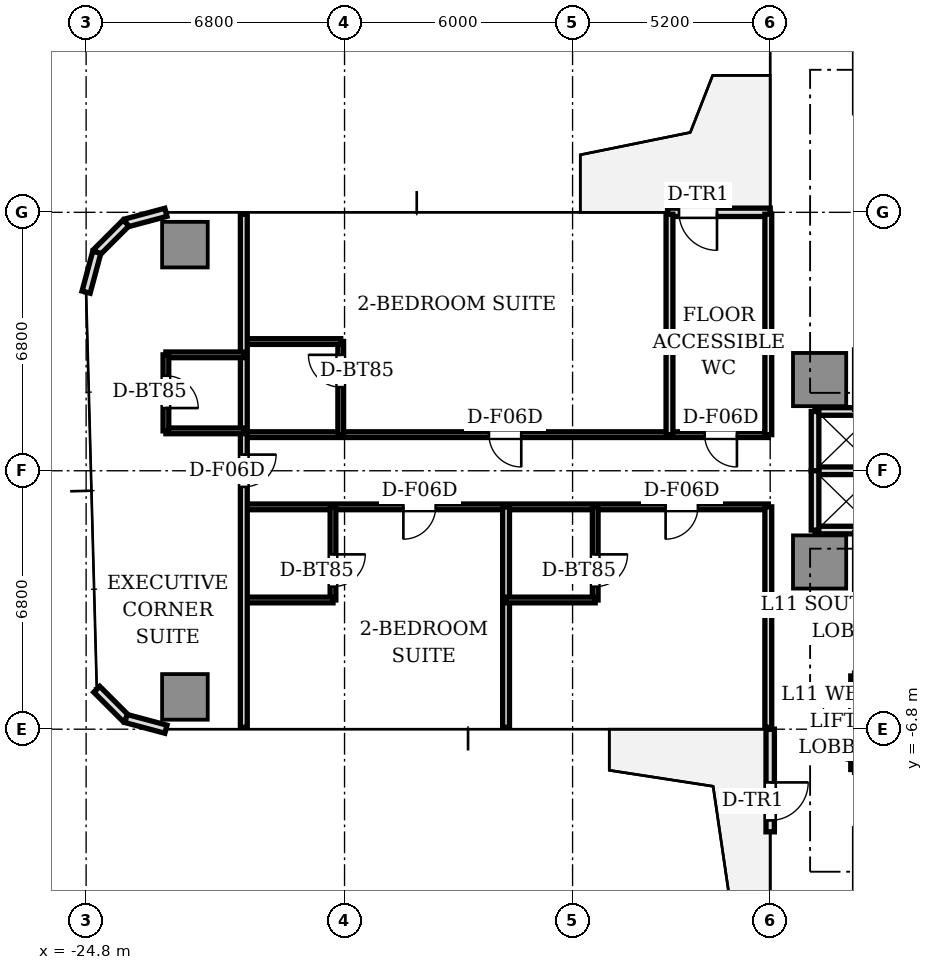
"""IFC4 building model, lengths in metres.
Left out: names, types, materials, properties, quantities, classifications, styles, units other than length and angle.
Written with IfcOpenShell. Run it as: python <this file> out.ifc"""

import sys

from ifc_helpers import new_model, si_unit, direction, frame, frame_2d, origin, origin_2d, place, context, subcontext, project, spatial, rectangle, extrude, source, transform, mapped, element, fill, save


model = new_model("IFC4")
c1 = context("Model", 3, precision=1e-05, world=origin(), true_north=direction((0.0, 1.0)))
c2 = subcontext(c1, "Body", "Model", "MODEL_VIEW")
j1 = project(units=[si_unit("LENGTHUNIT", "METRE"), si_unit("PLANEANGLEUNIT", "RADIAN")], contexts=[c1])
p1 = place(None, origin())
s1 = spatial("IfcSite", under=j1, at=p1, CompositionType="ELEMENT")
p2 = place(p1, origin())
s2 = spatial("IfcBuilding", under=s1, at=p2, CompositionType="ELEMENT")
p3 = place(p2, frame((0.0, 0.0, 43.2)))
s3 = spatial("IfcBuildingStorey", under=s2, at=p3, CompositionType="ELEMENT", Elevation=43.2)
m1 = source(origin(), c2, "Body", "SweptSolid", [
    extrude(rectangle(XDim=1.4, YDim=1.4, at=origin_2d()), origin(), (0.0, 0.0, 1.0), 3.05),
])
for number, where, z_axis, x_axis in (
    (1, (-5.5, 2.4, 0.0), (0.0, 0.0, 1.0), (1.0, 0.0, 0.0)),
    (2, (-5.5, -2.4, 0.0), (0.0, 0.0, 1.0), (1.0, 0.0, 0.0)),
):
    element("IfcColumn", number, at=place(p3, frame(where, z_axis=z_axis, x_axis=x_axis)), inside=s3, PredefinedType="COLUMN", context=c2, shape_type="MappedRepresentation", body=[
        mapped(m1, transform((0.0, 0.0, 0.0), scale=1.0)),
    ])
m2 = source(origin(), c2, "Body", "SweptSolid", [
    extrude(rectangle(XDim=1.2, YDim=1.2, at=origin_2d()), origin(), (0.0, 0.0, 1.0), 3.05),
])
for number, where, z_axis, x_axis in (
    (3, (-22.2, 5.95, 0.0), (0.0, 0.0, 1.0), (1.0, 0.0, 0.0)),
    (4, (-22.2, -5.95, 0.0), (0.0, 0.0, 1.0), (1.0, 0.0, 0.0)),
):
    element("IfcColumn", number, at=place(p3, frame(where, z_axis=z_axis, x_axis=x_axis)), inside=s3, PredefinedType="COLUMN", context=c2, shape_type="MappedRepresentation", body=[
        mapped(m2, transform((0.0, 0.0, 0.0), scale=1.0)),
    ])
p4 = place(p3, frame((-6.8, 6.8, 0.0), z_axis=(0.0, 0.0, 1.0), x_axis=(-1.0, 0.0, 0.0)))
e5 = element("IfcWall", 5, at=p4, inside=s3, PredefinedType="STANDARD", context=c2, shape_type="SweptSolid", body=[
    extrude(rectangle(XDim=2.7, YDim=0.22, at=frame_2d((1.35, 0.0))), origin(), (0.0, 0.0, 1.0), 3.05),
])
p5 = place(p4, frame((1.4, 0.0, 0.0)))
e6 = element("IfcOpeningElement", 6, at=p5, cuts=e5, PredefinedType="OPENING", context=c2, shape_type="SweptSolid", body=[
    extrude(rectangle(XDim=1.0, YDim=2.2, at=frame_2d((0.5, 1.1))), frame((0.0, 0.12, 0.0), z_axis=(0.0, -1.0, 0.0), x_axis=(1.0, 0.0, 0.0)), (0.0, 0.0, 1.0), 0.24),
])
for number, where, z_axis, x_axis in (
    (7, (-22.7, 6.8, 0.0), (0.0, 0.0, 1.0), (-0.966, -0.259, 0.0)),
    (8, (-23.75, 6.519, 0.0), (0.0, 0.0, 1.0), (-0.707, -0.707, 0.0)),
    (9, (-24.519, 5.75, 0.0), (0.0, 0.0, 1.0), (-0.259, -0.966, 0.0)),
    (10, (-24.519, -5.75, 0.0), (0.0, 0.0, 1.0), (0.707, -0.707, 0.0)),
    (11, (-23.75, -6.519, 0.0), (0.0, 0.0, 1.0), (0.966, -0.259, 0.0)),
):
    element("IfcWall", number, at=place(p3, frame(where, z_axis=z_axis, x_axis=x_axis)), inside=s3, PredefinedType="STANDARD", context=c2, shape_type="SweptSolid", body=[
        extrude(rectangle(XDim=1.087, YDim=0.22, at=frame_2d((0.543, 0.0))), origin(), (0.0, 0.0, 1.0), 3.05),
    ])
p6 = place(p3, frame((-6.8, -6.8, 0.0), z_axis=(0.0, 0.0, 1.0), x_axis=(0.0, -1.0, 0.0)))
e12 = element("IfcWall", 12, at=p6, inside=s3, PredefinedType="STANDARD", context=c2, shape_type="SweptSolid", body=[
    extrude(rectangle(XDim=2.7, YDim=0.22, at=frame_2d((1.35, 0.0))), origin(), (0.0, 0.0, 1.0), 3.05),
])
p7 = place(p6, frame((1.4, 0.0, 0.0)))
e13 = element("IfcOpeningElement", 13, at=p7, cuts=e12, PredefinedType="OPENING", context=c2, shape_type="SweptSolid", body=[
    extrude(rectangle(XDim=1.0, YDim=2.2, at=frame_2d((0.5, 1.1))), frame((0.0, 0.12, 0.0), z_axis=(0.0, -1.0, 0.0), x_axis=(1.0, 0.0, 0.0)), (0.0, 0.0, 1.0), 0.24),
])
for number, where, z_axis, x_axis in (
    (14, (-5.62, 1.56, 0.0), (0.0, 0.0, 1.0), (1.0, 0.0, 0.0)),
    (15, (-5.62, -1.56, 0.0), (0.0, 0.0, 1.0), (1.0, 0.0, 0.0)),
    (16, (-5.62, 0.0, 0.0), (0.0, 0.0, 1.0), (1.0, 0.0, 0.0)),
):
    element("IfcWall", number, at=place(p3, frame(where, z_axis=z_axis, x_axis=x_axis)), inside=s3, PredefinedType="SOLIDWALL", context=c2, shape_type="SweptSolid", body=[
        extrude(rectangle(XDim=1.64, YDim=0.2, at=frame_2d((0.82, 0.0))), origin(), (0.0, 0.0, 1.0), 2.6),
    ])
for number, where, z_axis, x_axis in (
    (17, (-5.62, 0.0, 0.0), (0.0, 0.0, 1.0), (0.0, 1.0, 0.0)),
    (18, (-5.62, -1.56, 0.0), (0.0, 0.0, 1.0), (0.0, 1.0, 0.0)),
):
    element("IfcWall", number, at=place(p3, frame(where, z_axis=z_axis, x_axis=x_axis)), inside=s3, PredefinedType="SOLIDWALL", context=c2, shape_type="SweptSolid", body=[
        extrude(rectangle(XDim=1.56, YDim=0.2, at=frame_2d((0.78, 0.0))), origin(), (0.0, 0.0, 1.0), 2.6),
    ])
p8 = place(p3, frame((-4.58, -7.86, 0.0), z_axis=(0.0, 0.0, 1.0), x_axis=(0.0, 1.0, 0.0)))
e19 = element("IfcWall", 19, at=p8, inside=s3, PredefinedType="SOLIDWALL", context=c2, shape_type="SweptSolid", body=[
    extrude(rectangle(XDim=2.46, YDim=0.2, at=frame_2d((1.23, 0.0))), origin(), (0.0, 0.0, 1.0), 2.6),
])
p9 = place(p8, frame((0.2, 0.0, 0.0)))
e20 = element("IfcOpeningElement", 20, at=p9, cuts=e19, PredefinedType="OPENING", context=c2, shape_type="SweptSolid", body=[
    extrude(rectangle(XDim=0.85, YDim=2.1, at=frame_2d((0.425, 1.05))), frame((0.0, 0.11, 0.0), z_axis=(0.0, -1.0, 0.0), x_axis=(1.0, 0.0, 0.0)), (0.0, 0.0, 1.0), 0.22),
])
p10 = place(p8, frame((1.38, 0.0, 0.0)))
e21 = element("IfcOpeningElement", 21, at=p10, cuts=e19, PredefinedType="OPENING", context=c2, shape_type="SweptSolid", body=[
    extrude(rectangle(XDim=0.85, YDim=2.1, at=frame_2d((0.425, 1.05))), frame((0.0, 0.11, 0.0), z_axis=(0.0, -1.0, 0.0), x_axis=(1.0, 0.0, 0.0)), (0.0, 0.0, 1.0), 0.22),
])
p11 = place(p3, frame((-6.85, -0.95, 0.0), z_axis=(0.0, 0.0, 1.0), x_axis=(-1.0, 0.0, 0.0)))
e22 = element("IfcWall", 22, at=p11, inside=s3, PredefinedType="PARTITIONING", context=c2, shape_type="SweptSolid", body=[
    extrude(rectangle(XDim=13.8, YDim=0.15, at=frame_2d((6.9, 0.0))), origin(), (0.0, 0.0, 1.0), 2.6),
])
p12 = place(p11, frame((1.852, 0.0, 0.0)))
e23 = element("IfcOpeningElement", 23, at=p12, cuts=e22, PredefinedType="OPENING", context=c2, shape_type="SweptSolid", body=[
    extrude(rectangle(XDim=0.85, YDim=2.1, at=frame_2d((0.425, 1.05))), frame((0.0, 0.085, 0.0), z_axis=(0.0, -1.0, 0.0), x_axis=(1.0, 0.0, 0.0)), (0.0, 0.0, 1.0), 0.17),
])
p13 = place(p11, frame((8.752, 0.0, 0.0)))
e24 = element("IfcOpeningElement", 24, at=p13, cuts=e22, PredefinedType="OPENING", context=c2, shape_type="SweptSolid", body=[
    extrude(rectangle(XDim=0.85, YDim=2.1, at=frame_2d((0.425, 1.05))), frame((0.0, 0.085, 0.0), z_axis=(0.0, -1.0, 0.0), x_axis=(1.0, 0.0, 0.0)), (0.0, 0.0, 1.0), 0.17),
])
p14 = place(p3, frame((-6.85, 0.95, 0.0), z_axis=(0.0, 0.0, 1.0), x_axis=(-1.0, 0.0, 0.0)))
e25 = element("IfcWall", 25, at=p14, inside=s3, PredefinedType="PARTITIONING", context=c2, shape_type="SweptSolid", body=[
    extrude(rectangle(XDim=13.8, YDim=0.15, at=frame_2d((6.9, 0.0))), origin(), (0.0, 0.0, 1.0), 2.6),
])
p15 = place(p14, frame((0.825, 0.0, 0.0)))
e26 = element("IfcOpeningElement", 26, at=p15, cuts=e25, PredefinedType="OPENING", context=c2, shape_type="SweptSolid", body=[
    extrude(rectangle(XDim=0.85, YDim=2.1, at=frame_2d((0.425, 1.05))), frame((0.0, 0.085, 0.0), z_axis=(0.0, -1.0, 0.0), x_axis=(1.0, 0.0, 0.0)), (0.0, 0.0, 1.0), 0.17),
])
p16 = place(p14, frame((6.5, 0.0, 0.0)))
e27 = element("IfcOpeningElement", 27, at=p16, cuts=e25, PredefinedType="OPENING", context=c2, shape_type="SweptSolid", body=[
    extrude(rectangle(XDim=0.85, YDim=2.1, at=frame_2d((0.425, 1.05))), frame((0.0, 0.085, 0.0), z_axis=(0.0, -1.0, 0.0), x_axis=(1.0, 0.0, 0.0)), (0.0, 0.0, 1.0), 0.17),
])
for number, where, z_axis, x_axis in (
    (28, (-6.85, -0.95, 0.0), (0.0, 0.0, 1.0), (0.0, -1.0, 0.0)),
    (29, (-6.85, 6.75, 0.0), (0.0, 0.0, 1.0), (0.0, -1.0, 0.0)),
    (30, (-13.75, -0.95, 0.0), (0.0, 0.0, 1.0), (0.0, -1.0, 0.0)),
):
    element("IfcWall", number, at=place(p3, frame(where, z_axis=z_axis, x_axis=x_axis)), inside=s3, PredefinedType="PARTITIONING", context=c2, shape_type="SweptSolid", body=[
        extrude(rectangle(XDim=5.8, YDim=0.18, at=frame_2d((2.9, 0.0))), origin(), (0.0, 0.0, 1.0), 2.6),
    ])
p17 = place(p3, frame((-11.404, -0.95, 0.0), z_axis=(0.0, 0.0, 1.0), x_axis=(0.0, -1.0, 0.0)))
e31 = element("IfcWall", 31, at=p17, inside=s3, PredefinedType="PARTITIONING", context=c2, shape_type="SweptSolid", body=[
    extrude(rectangle(XDim=2.45, YDim=0.15, at=frame_2d((1.225, 0.0))), origin(), (0.0, 0.0, 1.0), 2.6),
])
p18 = place(p17, frame((1.25, 0.0, 0.0)))
e32 = element("IfcOpeningElement", 32, at=p18, cuts=e31, PredefinedType="OPENING", context=c2, shape_type="SweptSolid", body=[
    extrude(rectangle(XDim=0.85, YDim=2.1, at=frame_2d((0.425, 1.05))), frame((0.0, 0.085, 0.0), z_axis=(0.0, -1.0, 0.0), x_axis=(1.0, 0.0, 0.0)), (0.0, 0.0, 1.0), 0.17),
])
p19 = place(p3, frame((-11.404, -3.4, 0.0), z_axis=(0.0, 0.0, 1.0), x_axis=(-1.0, 0.0, 0.0)))
e33 = element("IfcWall", 33, at=p19, inside=s3, PredefinedType="PARTITIONING", context=c2, shape_type="SweptSolid", body=[
    extrude(rectangle(XDim=2.346, YDim=0.15, at=frame_2d((1.173, 0.0))), origin(), (0.0, 0.0, 1.0), 2.57),
])
p20 = place(p3, frame((-18.304, -0.95, 0.0), z_axis=(0.0, 0.0, 1.0), x_axis=(0.0, -1.0, 0.0)))
e34 = element("IfcWall", 34, at=p20, inside=s3, PredefinedType="PARTITIONING", context=c2, shape_type="SweptSolid", body=[
    extrude(rectangle(XDim=2.45, YDim=0.15, at=frame_2d((1.225, 0.0))), origin(), (0.0, 0.0, 1.0), 2.6),
])
p21 = place(p20, frame((1.25, 0.0, 0.0)))
e35 = element("IfcOpeningElement", 35, at=p21, cuts=e34, PredefinedType="OPENING", context=c2, shape_type="SweptSolid", body=[
    extrude(rectangle(XDim=0.85, YDim=2.1, at=frame_2d((0.425, 1.05))), frame((0.0, 0.085, 0.0), z_axis=(0.0, -1.0, 0.0), x_axis=(1.0, 0.0, 0.0)), (0.0, 0.0, 1.0), 0.17),
])
p22 = place(p3, frame((-18.304, -3.4, 0.0), z_axis=(0.0, 0.0, 1.0), x_axis=(-1.0, 0.0, 0.0)))
e36 = element("IfcWall", 36, at=p22, inside=s3, PredefinedType="PARTITIONING", context=c2, shape_type="SweptSolid", body=[
    extrude(rectangle(XDim=2.346, YDim=0.15, at=frame_2d((1.173, 0.0))), origin(), (0.0, 0.0, 1.0), 2.57),
])
p23 = place(p3, frame((-9.45, 0.95, 0.0), z_axis=(0.0, 0.0, 1.0), x_axis=(0.0, 1.0, 0.0)))
e37 = element("IfcWall", 37, at=p23, inside=s3, PredefinedType="PARTITIONING", context=c2, shape_type="SweptSolid", body=[
    extrude(rectangle(XDim=5.8, YDim=0.18, at=frame_2d((2.9, 0.0))), origin(), (0.0, 0.0, 1.0), 2.6),
])
p24 = place(p3, frame((-18.1, 0.95, 0.0), z_axis=(0.0, 0.0, 1.0), x_axis=(0.0, 1.0, 0.0)))
e38 = element("IfcWall", 38, at=p24, inside=s3, PredefinedType="PARTITIONING", context=c2, shape_type="SweptSolid", body=[
    extrude(rectangle(XDim=2.45, YDim=0.15, at=frame_2d((1.225, 0.0))), origin(), (0.0, 0.0, 1.0), 2.6),
])
p25 = place(p24, frame((1.25, 0.0, 0.0)))
e39 = element("IfcOpeningElement", 39, at=p25, cuts=e38, PredefinedType="OPENING", context=c2, shape_type="SweptSolid", body=[
    extrude(rectangle(XDim=0.85, YDim=2.1, at=frame_2d((0.425, 1.05))), frame((0.0, 0.085, 0.0), z_axis=(0.0, -1.0, 0.0), x_axis=(1.0, 0.0, 0.0)), (0.0, 0.0, 1.0), 0.17),
])
p26 = place(p3, frame((-18.1, 3.4, 0.0), z_axis=(0.0, 0.0, 1.0), x_axis=(-1.0, 0.0, 0.0)))
e40 = element("IfcWall", 40, at=p26, inside=s3, PredefinedType="PARTITIONING", context=c2, shape_type="SweptSolid", body=[
    extrude(rectangle(XDim=2.55, YDim=0.15, at=frame_2d((1.275, 0.0))), origin(), (0.0, 0.0, 1.0), 2.57),
])
p27 = place(p3, frame((-20.65, 6.75, 0.0), z_axis=(0.0, 0.0, 1.0), x_axis=(0.0, -1.0, 0.0)))
e41 = element("IfcWall", 41, at=p27, inside=s3, PredefinedType="PARTITIONING", context=c2, shape_type="SweptSolid", body=[
    extrude(rectangle(XDim=13.5, YDim=0.18, at=frame_2d((6.75, 0.0))), origin(), (0.0, 0.0, 1.0), 2.6),
])
p28 = place(p27, frame((6.325, 0.0, 0.0)))
e42 = element("IfcOpeningElement", 42, at=p28, cuts=e41, PredefinedType="OPENING", context=c2, shape_type="SweptSolid", body=[
    extrude(rectangle(XDim=0.85, YDim=2.1, at=frame_2d((0.425, 1.05))), frame((0.0, 0.1, 0.0), z_axis=(0.0, -1.0, 0.0), x_axis=(1.0, 0.0, 0.0)), (0.0, 0.0, 1.0), 0.2),
])
p29 = place(p3, frame((-20.65, 1.05, 0.0), z_axis=(0.0, 0.0, 1.0), x_axis=(-1.0, 0.0, 0.0)))
e43 = element("IfcWall", 43, at=p29, inside=s3, PredefinedType="PARTITIONING", context=c2, shape_type="SweptSolid", body=[
    extrude(rectangle(XDim=2.05, YDim=0.15, at=frame_2d((1.025, 0.0))), origin(), (0.0, 0.0, 1.0), 2.6),
])
p30 = place(p3, frame((-20.65, 3.05, 0.0), z_axis=(0.0, 0.0, 1.0), x_axis=(-1.0, 0.0, 0.0)))
e44 = element("IfcWall", 44, at=p30, inside=s3, PredefinedType="PARTITIONING", context=c2, shape_type="SweptSolid", body=[
    extrude(rectangle(XDim=2.05, YDim=0.15, at=frame_2d((1.025, 0.0))), origin(), (0.0, 0.0, 1.0), 2.57),
])
p31 = place(p3, frame((-22.7, 3.05, 0.0), z_axis=(0.0, 0.0, 1.0), x_axis=(0.0, -1.0, 0.0)))
e45 = element("IfcWall", 45, at=p31, inside=s3, PredefinedType="PARTITIONING", context=c2, shape_type="SweptSolid", body=[
    extrude(rectangle(XDim=2.0, YDim=0.15, at=frame_2d((1.0, 0.0))), origin(), (0.0, 0.0, 1.0), 2.6),
])
p32 = place(p31, frame((0.55, 0.0, 0.0)))
e46 = element("IfcOpeningElement", 46, at=p32, cuts=e45, PredefinedType="OPENING", context=c2, shape_type="SweptSolid", body=[
    extrude(rectangle(XDim=0.85, YDim=2.1, at=frame_2d((0.425, 1.05))), frame((0.0, 0.085, 0.0), z_axis=(0.0, -1.0, 0.0), x_axis=(1.0, 0.0, 0.0)), (0.0, 0.0, 1.0), 0.17),
])
m3 = source(origin(), c2, "Body", "SweptSolid", [
    extrude(rectangle(XDim=1.0, YDim=0.05, at=origin_2d()), origin(), (0.0, 0.0, 1.0), 2.2),
])
p33 = place(p5, frame((0.5, 0.0, 0.0)))
e47 = element("IfcDoor", 47, at=p33, inside=s3, OperationType="SINGLE_SWING_LEFT", PredefinedType="DOOR", context=c2, shape_type="MappedRepresentation", body=[
    mapped(m3, transform((0.0, 0.0, 0.0), scale=1.0)),
])
fill(e6, e47)
p34 = place(p7, frame((0.5, 0.0, 0.0)))
e48 = element("IfcDoor", 48, at=p34, inside=s3, OperationType="SINGLE_SWING_LEFT", PredefinedType="DOOR", context=c2, shape_type="MappedRepresentation", body=[
    mapped(m3, transform((0.0, 0.0, 0.0), scale=1.0)),
])
fill(e13, e48)
m4 = source(origin(), c2, "Body", "SweptSolid", [
    extrude(rectangle(XDim=0.85, YDim=0.05, at=origin_2d()), origin(), (0.0, 0.0, 1.0), 2.1),
])
p35 = place(p18, frame((0.425, 0.0, 0.0)))
e49 = element("IfcDoor", 49, at=p35, inside=s3, OperationType="SINGLE_SWING_LEFT", PredefinedType="DOOR", context=c2, shape_type="MappedRepresentation", body=[
    mapped(m4, transform((0.0, 0.0, 0.0), scale=1.0)),
])
fill(e32, e49)
p36 = place(p12, frame((0.425, 0.0, 0.0)))
e50 = element("IfcDoor", 50, at=p36, inside=s3, OperationType="SINGLE_SWING_RIGHT", PredefinedType="DOOR", context=c2, shape_type="MappedRepresentation", body=[
    mapped(m4, transform((0.0, 0.0, 0.0), scale=1.0)),
])
fill(e23, e50)
p37 = place(p21, frame((0.425, 0.0, 0.0)))
e51 = element("IfcDoor", 51, at=p37, inside=s3, OperationType="SINGLE_SWING_LEFT", PredefinedType="DOOR", context=c2, shape_type="MappedRepresentation", body=[
    mapped(m4, transform((0.0, 0.0, 0.0), scale=1.0)),
])
fill(e35, e51)
p38 = place(p13, frame((0.425, 0.0, 0.0)))
e52 = element("IfcDoor", 52, at=p38, inside=s3, OperationType="SINGLE_SWING_RIGHT", PredefinedType="DOOR", context=c2, shape_type="MappedRepresentation", body=[
    mapped(m4, transform((0.0, 0.0, 0.0), scale=1.0)),
])
fill(e24, e52)
p39 = place(p15, frame((0.425, 0.0, 0.0)))
e53 = element("IfcDoor", 53, at=p39, inside=s3, OperationType="SINGLE_SWING_LEFT", PredefinedType="DOOR", context=c2, shape_type="MappedRepresentation", body=[
    mapped(m4, transform((0.0, 0.0, 0.0), scale=1.0)),
])
fill(e26, e53)
p40 = place(p25, frame((0.425, 0.0, 0.0)))
e54 = element("IfcDoor", 54, at=p40, inside=s3, OperationType="SINGLE_SWING_RIGHT", PredefinedType="DOOR", context=c2, shape_type="MappedRepresentation", body=[
    mapped(m4, transform((0.0, 0.0, 0.0), scale=1.0)),
])
fill(e39, e54)
p41 = place(p16, frame((0.425, 0.0, 0.0)))
e55 = element("IfcDoor", 55, at=p41, inside=s3, OperationType="SINGLE_SWING_LEFT", PredefinedType="DOOR", context=c2, shape_type="MappedRepresentation", body=[
    mapped(m4, transform((0.0, 0.0, 0.0), scale=1.0)),
])
fill(e27, e55)
p42 = place(p32, frame((0.425, 0.0, 0.0)))
e56 = element("IfcDoor", 56, at=p42, inside=s3, OperationType="SINGLE_SWING_RIGHT", PredefinedType="DOOR", context=c2, shape_type="MappedRepresentation", body=[
    mapped(m4, transform((0.0, 0.0, 0.0), scale=1.0)),
])
fill(e46, e56)
p43 = place(p28, frame((0.425, 0.0, 0.0)))
e57 = element("IfcDoor", 57, at=p43, inside=s3, OperationType="SINGLE_SWING_LEFT", PredefinedType="DOOR", context=c2, shape_type="MappedRepresentation", body=[
    mapped(m4, transform((0.0, 0.0, 0.0), scale=1.0)),
])
fill(e42, e57)
save(model, sys.argv[1])
